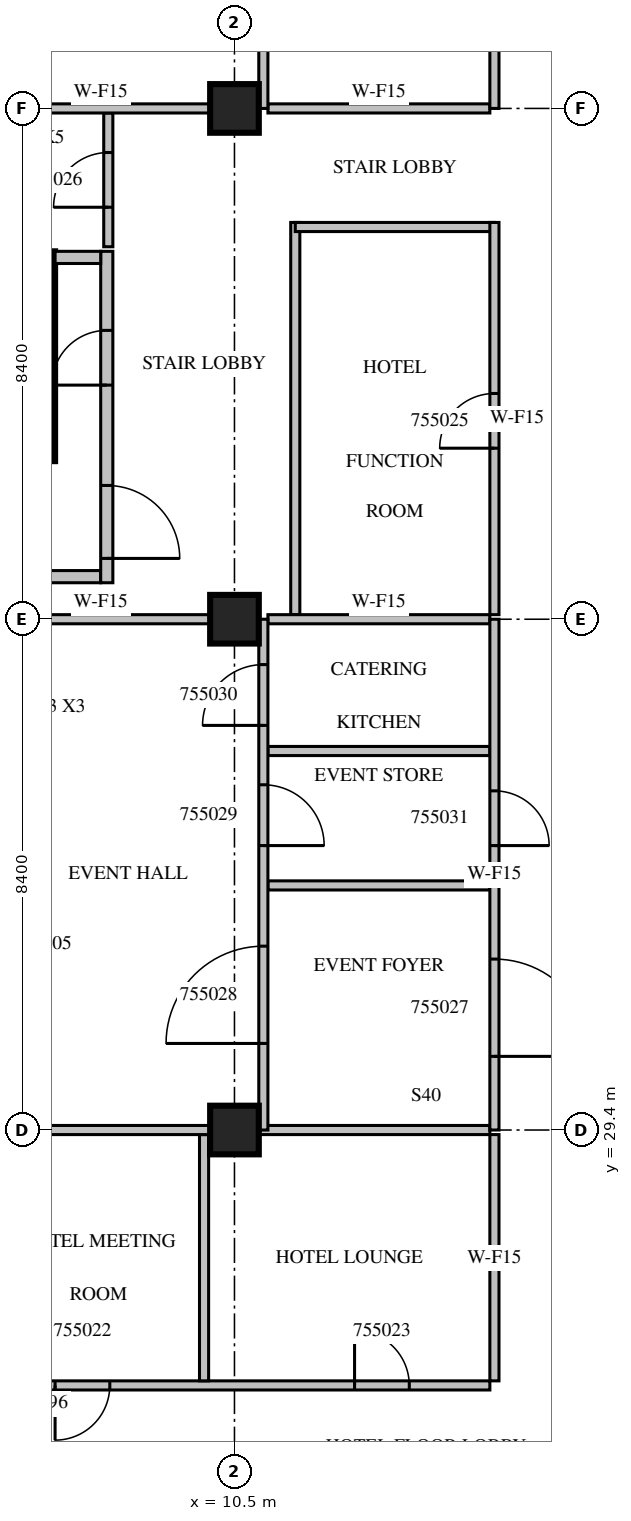
"""IFC4 building model, lengths in metres.
Left out: names, types, materials, properties, quantities, classifications, styles, units other than length and angle.
Written with IfcOpenShell. Run it as: python <this file> out.ifc"""

import sys

from ifc_helpers import new_model, si_unit, direction, frame, frame_2d, origin, origin_2d, place, context, subcontext, project, spatial, rectangle, extrude, source, transform, mapped, element, fill, save


model = new_model("IFC4")
c1 = context("Model", 3, precision=1e-05, world=origin(), true_north=direction((0.0, 1.0)))
c2 = subcontext(c1, "Body", "Model", "MODEL_VIEW")
j1 = project(units=[si_unit("LENGTHUNIT", "METRE"), si_unit("PLANEANGLEUNIT", "RADIAN")], contexts=[c1])
p1 = place(None, origin())
s1 = spatial("IfcSite", under=j1, at=p1, CompositionType="ELEMENT")
p2 = place(p1, origin())
s2 = spatial("IfcBuilding", under=s1, at=p2, CompositionType="ELEMENT")
p3 = place(p2, frame((0.0, 0.0, 242.4)))
s3 = spatial("IfcBuildingStorey", under=s2, at=p3, CompositionType="ELEMENT", Elevation=242.4)
m1 = source(origin(), c2, "Body", "SweptSolid", [
    extrude(rectangle(XDim=0.8, YDim=0.8, at=origin_2d()), origin(), (0.0, 0.0, 1.0), 3.8),
])
for number, where, z_axis, x_axis in (
    (1, (10.5, 29.4, 0.0), (0.0, 0.0, 1.0), (1.0, 0.0, 0.0)),
    (2, (10.5, 37.8, 0.0), (0.0, 0.0, 1.0), (1.0, 0.0, 0.0)),
    (3, (10.5, 46.2, 0.0), (0.0, 0.0, 1.0), (1.0, 0.0, 0.0)),
):
    element("IfcColumn", number, at=place(p3, frame(where, z_axis=z_axis, x_axis=x_axis)), inside=s3, PredefinedType="COLUMN", context=c2, shape_type="MappedRepresentation", body=[
        mapped(m1, transform((0.0, 0.0, 0.0), scale=1.0)),
    ])
m2 = source(origin(), c2, "Body", "SweptSolid", [
    extrude(rectangle(XDim=3.45, YDim=0.25, at=frame_2d((1.725, 0.0))), origin(), (0.0, 0.0, 1.0), 3.4),
])
p4 = place(p3, frame((7.425, 40.4, 0.0), z_axis=(0.0, 0.0, 1.0), x_axis=(0.0, 1.0, 0.0)))
e4 = element("IfcWall", 4, at=p4, inside=s3, PredefinedType="SOLIDWALL", context=c2, shape_type="MappedRepresentation", body=[
    mapped(m2, transform((0.0, 0.0, 0.0), scale=1.0)),
])
m3 = source(origin(), c2, "Body", "SweptSolid", [
    extrude(rectangle(XDim=2.0, YDim=0.2, at=frame_2d((1.0, 0.0))), origin(), (0.0, 0.0, 1.0), 3.4),
])
p5 = place(p3, frame((6.3, 38.5, 0.0), z_axis=(0.0, 0.0, 1.0), x_axis=(1.0, 0.0, 0.0)))
e5 = element("IfcWall", 5, at=p5, inside=s3, PredefinedType="PARTITIONING", context=c2, shape_type="MappedRepresentation", body=[
    mapped(m3, transform((0.0, 0.0, 0.0), scale=1.0)),
])
m4 = source(origin(), c2, "Body", "SweptSolid", [
    extrude(rectangle(XDim=5.45, YDim=0.2, at=frame_2d((2.725, 0.0))), origin(), (0.0, 0.0, 1.0), 3.4),
])
p6 = place(p3, frame((8.4, 38.4, 0.0), z_axis=(0.0, 0.0, 1.0), x_axis=(0.0, 1.0, 0.0)))
e6 = element("IfcWall", 6, at=p6, inside=s3, PredefinedType="PARTITIONING", context=c2, shape_type="MappedRepresentation", body=[
    mapped(m4, transform((0.0, 0.0, 0.0), scale=1.0)),
])
m5 = source(origin(), c2, "Body", "SweptSolid", [
    extrude(rectangle(XDim=1.2, YDim=2.1, at=frame_2d((0.6, 1.05))), frame((0.0, 0.11, 0.0), z_axis=(0.0, -1.0, 0.0), x_axis=(1.0, 0.0, 0.0)), (0.0, 0.0, 1.0), 0.22),
])
p7 = place(p6, frame((0.4, 0.0, 0.0)))
e7 = element("IfcOpeningElement", 7, at=p7, cuts=e6, PredefinedType="OPENING", context=c2, shape_type="MappedRepresentation", body=[
    mapped(m5, transform((0.0, 0.0, 0.0), scale=1.0)),
])
m6 = source(origin(), c2, "Body", "SweptSolid", [
    extrude(rectangle(XDim=0.9, YDim=2.1, at=frame_2d((0.45, 1.05))), frame((0.0, 0.11, 0.0), z_axis=(0.0, -1.0, 0.0), x_axis=(1.0, 0.0, 0.0)), (0.0, 0.0, 1.0), 0.22),
])
p8 = place(p6, frame((3.25, 0.0, 0.0)))
e8 = element("IfcOpeningElement", 8, at=p8, cuts=e6, PredefinedType="OPENING", context=c2, shape_type="MappedRepresentation", body=[
    mapped(m6, transform((0.0, 0.0, 0.0), scale=1.0)),
])
m7 = source(origin(), c2, "Body", "SweptSolid", [
    extrude(rectangle(XDim=0.75, YDim=0.2, at=frame_2d((0.375, 0.0))), origin(), (0.0, 0.0, 1.0), 3.4),
])
p9 = place(p3, frame((7.55, 43.75, 0.0), z_axis=(0.0, 0.0, 1.0), x_axis=(1.0, 0.0, 0.0)))
e9 = element("IfcWall", 9, at=p9, inside=s3, PredefinedType="PARTITIONING", context=c2, shape_type="MappedRepresentation", body=[
    mapped(m7, transform((0.0, 0.0, 0.0), scale=1.0)),
])
m8 = source(origin(), c2, "Body", "SweptSolid", [
    extrude(rectangle(XDim=8.195, YDim=0.15, at=frame_2d((4.098, 0.0))), origin(), (0.0, 0.0, 1.0), 3.4),
])
p10 = place(p3, frame((6.505, 25.2, 0.0), z_axis=(0.0, 0.0, 1.0), x_axis=(1.0, 0.0, 0.0)))
e10 = element("IfcWall", 10, at=p10, inside=s3, PredefinedType="PARTITIONING", context=c2, shape_type="MappedRepresentation", body=[
    mapped(m8, transform((0.0, 0.0, 0.0), scale=1.0)),
])
m9 = source(origin(), c2, "Body", "SweptSolid", [
    extrude(rectangle(XDim=0.9, YDim=2.1, at=frame_2d((0.45, 1.05))), frame((0.0, 0.085, 0.0), z_axis=(0.0, -1.0, 0.0), x_axis=(1.0, 0.0, 0.0)), (0.0, 0.0, 1.0), 0.17),
])
p11 = place(p10, frame((1.045, 0.0, 0.0)))
e11 = element("IfcOpeningElement", 11, at=p11, cuts=e10, PredefinedType="OPENING", context=c2, shape_type="MappedRepresentation", body=[
    mapped(m9, transform((0.0, 0.0, 0.0), scale=1.0)),
])
p12 = place(p10, frame((5.97, 0.0, 0.0)))
e12 = element("IfcOpeningElement", 12, at=p12, cuts=e10, PredefinedType="OPENING", context=c2, shape_type="MappedRepresentation", body=[
    mapped(m9, transform((0.0, 0.0, 0.0), scale=1.0)),
])
m10 = source(origin(), c2, "Body", "SweptSolid", [
    extrude(rectangle(XDim=4.05, YDim=0.15, at=frame_2d((2.025, 0.0))), origin(), (0.0, 0.0, 1.0), 3.4),
])
for number, where, z_axis, x_axis in (
    (13, (10.0, 25.275, 0.0), (0.0, 0.0, 1.0), (0.0, 1.0, 0.0)),
    (14, (14.775, 25.275, 0.0), (0.0, 0.0, 1.0), (0.0, 1.0, 0.0)),
):
    element("IfcWall", number, at=place(p3, frame(where, z_axis=z_axis, x_axis=x_axis)), inside=s3, PredefinedType="PARTITIONING", context=c2, shape_type="MappedRepresentation", body=[
        mapped(m10, transform((0.0, 0.0, 0.0), scale=1.0)),
    ])
m11 = source(origin(), c2, "Body", "SweptSolid", [
    extrude(rectangle(XDim=3.596, YDim=0.15, at=frame_2d((1.798, 0.0))), origin(), (0.0, 0.0, 1.0), 3.4),
])
p13 = place(p3, frame((10.101, 29.4, 0.0), z_axis=(0.0, 0.0, 1.0), x_axis=(-1.0, 0.0, 0.0)))
e15 = element("IfcWall", 15, at=p13, inside=s3, PredefinedType="PARTITIONING", context=c2, shape_type="MappedRepresentation", body=[
    mapped(m11, transform((0.0, 0.0, 0.0), scale=1.0)),
])
m12 = source(origin(), c2, "Body", "SweptSolid", [
    extrude(rectangle(XDim=3.801, YDim=0.15, at=frame_2d((1.901, 0.0))), origin(), (0.0, 0.0, 1.0), 3.4),
])
p14 = place(p3, frame((14.7, 29.4, 0.0), z_axis=(0.0, 0.0, 1.0), x_axis=(-1.0, 0.0, 0.0)))
e16 = element("IfcWall", 16, at=p14, inside=s3, PredefinedType="PARTITIONING", context=c2, shape_type="MappedRepresentation", body=[
    mapped(m12, transform((0.0, 0.0, 0.0), scale=1.0)),
])
m13 = source(origin(), c2, "Body", "SweptSolid", [
    extrude(rectangle(XDim=6.45, YDim=0.15, at=frame_2d((3.225, 0.0))), origin(), (0.0, 0.0, 1.0), 3.4),
])
p15 = place(p3, frame((11.5, 44.325, 0.0), z_axis=(0.0, 0.0, 1.0), x_axis=(0.0, -1.0, 0.0)))
e17 = element("IfcWall", 17, at=p15, inside=s3, PredefinedType="PARTITIONING", context=c2, shape_type="MappedRepresentation", body=[
    mapped(m13, transform((0.0, 0.0, 0.0), scale=1.0)),
])
m14 = source(origin(), c2, "Body", "SweptSolid", [
    extrude(rectangle(XDim=3.275, YDim=0.15, at=frame_2d((1.637, 0.0))), origin(), (0.0, 0.0, 1.0), 3.4),
])
p16 = place(p3, frame((14.775, 44.25, 0.0), z_axis=(0.0, 0.0, 1.0), x_axis=(-1.0, 0.0, 0.0)))
e18 = element("IfcWall", 18, at=p16, inside=s3, PredefinedType="PARTITIONING", context=c2, shape_type="MappedRepresentation", body=[
    mapped(m14, transform((0.0, 0.0, 0.0), scale=1.0)),
])
p17 = place(p3, frame((14.775, 37.875, 0.0), z_axis=(0.0, 0.0, 1.0), x_axis=(0.0, 1.0, 0.0)))
e19 = element("IfcWall", 19, at=p17, inside=s3, PredefinedType="PARTITIONING", context=c2, shape_type="MappedRepresentation", body=[
    mapped(m13, transform((0.0, 0.0, 0.0), scale=1.0)),
])
p18 = place(p17, frame((2.737, 0.0, 0.0)))
e20 = element("IfcOpeningElement", 20, at=p18, cuts=e19, PredefinedType="OPENING", context=c2, shape_type="MappedRepresentation", body=[
    mapped(m9, transform((0.0, 0.0, 0.0), scale=1.0)),
])
m15 = source(origin(), c2, "Body", "SweptSolid", [
    extrude(rectangle(XDim=2.2, YDim=0.15, at=frame_2d((1.1, 0.0))), origin(), (0.0, 0.0, 1.0), 3.4),
])
p19 = place(p3, frame((8.425, 43.925, 0.0), z_axis=(0.0, 0.0, 1.0), x_axis=(0.0, 1.0, 0.0)))
e21 = element("IfcWall", 21, at=p19, inside=s3, PredefinedType="PARTITIONING", context=c2, shape_type="MappedRepresentation", body=[
    mapped(m15, transform((0.0, 0.0, 0.0), scale=1.0)),
])
p20 = place(p19, frame((0.65, 0.0, 0.0)))
e22 = element("IfcOpeningElement", 22, at=p20, cuts=e21, PredefinedType="OPENING", context=c2, shape_type="MappedRepresentation", body=[
    mapped(m9, transform((0.0, 0.0, 0.0), scale=1.0)),
])
m16 = source(origin(), c2, "Body", "SweptSolid", [
    extrude(rectangle(XDim=3.65, YDim=0.15, at=frame_2d((1.825, 0.0))), origin(), (0.0, 0.0, 1.0), 3.4),
])
for number, where, z_axis, x_axis in (
    (23, (14.7, 33.422, 0.0), (0.0, 0.0, 1.0), (-1.0, 0.0, 0.0)),
    (24, (14.7, 35.633, 0.0), (0.0, 0.0, 1.0), (-1.0, 0.0, 0.0)),
):
    element("IfcWall", number, at=place(p3, frame(where, z_axis=z_axis, x_axis=x_axis)), inside=s3, PredefinedType="PARTITIONING", context=c2, shape_type="MappedRepresentation", body=[
        mapped(m16, transform((0.0, 0.0, 0.0), scale=1.0)),
    ])
p21 = place(p3, frame((10.101, 37.8, 0.0), z_axis=(0.0, 0.0, 1.0), x_axis=(-1.0, 0.0, 0.0)))
e25 = element("IfcWall", 25, at=p21, inside=s3, PredefinedType="PARTITIONING", context=c2, shape_type="MappedRepresentation", body=[
    mapped(m11, transform((0.0, 0.0, 0.0), scale=1.0)),
])
p22 = place(p3, frame((14.7, 37.8, 0.0), z_axis=(0.0, 0.0, 1.0), x_axis=(-1.0, 0.0, 0.0)))
e26 = element("IfcWall", 26, at=p22, inside=s3, PredefinedType="PARTITIONING", context=c2, shape_type="MappedRepresentation", body=[
    mapped(m16, transform((0.0, 0.0, 0.0), scale=1.0)),
])
m17 = source(origin(), c2, "Body", "SweptSolid", [
    extrude(rectangle(XDim=8.4, YDim=0.15, at=frame_2d((4.2, 0.0))), origin(), (0.0, 0.0, 1.0), 3.4),
])
p23 = place(p3, frame((10.975, 29.4, 0.0), z_axis=(0.0, 0.0, 1.0), x_axis=(0.0, 1.0, 0.0)))
e27 = element("IfcWall", 27, at=p23, inside=s3, PredefinedType="PARTITIONING", context=c2, shape_type="MappedRepresentation", body=[
    mapped(m17, transform((0.0, 0.0, 0.0), scale=1.0)),
])
m18 = source(origin(), c2, "Body", "SweptSolid", [
    extrude(rectangle(XDim=1.6, YDim=2.1, at=frame_2d((0.8, 1.05))), frame((0.0, 0.085, 0.0), z_axis=(0.0, -1.0, 0.0), x_axis=(1.0, 0.0, 0.0)), (0.0, 0.0, 1.0), 0.17),
])
p24 = place(p23, frame((1.424, 0.0, 0.0)))
e28 = element("IfcOpeningElement", 28, at=p24, cuts=e27, PredefinedType="OPENING", context=c2, shape_type="MappedRepresentation", body=[
    mapped(m18, transform((0.0, 0.0, 0.0), scale=1.0)),
])
m19 = source(origin(), c2, "Body", "SweptSolid", [
    extrude(rectangle(XDim=1.0, YDim=2.1, at=frame_2d((0.5, 1.05))), frame((0.0, 0.085, 0.0), z_axis=(0.0, -1.0, 0.0), x_axis=(1.0, 0.0, 0.0)), (0.0, 0.0, 1.0), 0.17),
])
p25 = place(p23, frame((4.678, 0.0, 0.0)))
e29 = element("IfcOpeningElement", 29, at=p25, cuts=e27, PredefinedType="OPENING", context=c2, shape_type="MappedRepresentation", body=[
    mapped(m19, transform((0.0, 0.0, 0.0), scale=1.0)),
])
p26 = place(p23, frame((6.654, 0.0, 0.0)))
e30 = element("IfcOpeningElement", 30, at=p26, cuts=e27, PredefinedType="OPENING", context=c2, shape_type="MappedRepresentation", body=[
    mapped(m19, transform((0.0, 0.0, 0.0), scale=1.0)),
])
p27 = place(p3, frame((10.101, 46.2, 0.0), z_axis=(0.0, 0.0, 1.0), x_axis=(-1.0, 0.0, 0.0)))
e31 = element("IfcWall", 31, at=p27, inside=s3, PredefinedType="PARTITIONING", context=c2, shape_type="MappedRepresentation", body=[
    mapped(m11, transform((0.0, 0.0, 0.0), scale=1.0)),
])
p28 = place(p3, frame((14.7, 46.2, 0.0), z_axis=(0.0, 0.0, 1.0), x_axis=(-1.0, 0.0, 0.0)))
e32 = element("IfcWall", 32, at=p28, inside=s3, PredefinedType="PARTITIONING", context=c2, shape_type="MappedRepresentation", body=[
    mapped(m16, transform((0.0, 0.0, 0.0), scale=1.0)),
])
m20 = source(origin(), c2, "Body", "SweptSolid", [
    extrude(rectangle(XDim=7.26, YDim=0.15, at=frame_2d((3.63, 0.0))), origin(), (0.0, 0.0, 1.0), 3.4),
])
p29 = place(p3, frame((10.975, 46.2, 0.0), z_axis=(0.0, 0.0, 1.0), x_axis=(0.0, 1.0, 0.0)))
e33 = element("IfcWall", 33, at=p29, inside=s3, PredefinedType="PARTITIONING", context=c2, shape_type="MappedRepresentation", body=[
    mapped(m20, transform((0.0, 0.0, 0.0), scale=1.0)),
])
p30 = place(p29, frame((1.169, 0.0, 0.0)))
e34 = element("IfcOpeningElement", 34, at=p30, cuts=e33, PredefinedType="OPENING", context=c2, shape_type="MappedRepresentation", body=[
    mapped(m18, transform((0.0, 0.0, 0.0), scale=1.0)),
])
p31 = place(p29, frame((4.025, 0.0, 0.0)))
e35 = element("IfcOpeningElement", 35, at=p31, cuts=e33, PredefinedType="OPENING", context=c2, shape_type="MappedRepresentation", body=[
    mapped(m19, transform((0.0, 0.0, 0.0), scale=1.0)),
])
p32 = place(p3, frame((14.775, 29.4, 0.0), z_axis=(0.0, 0.0, 1.0), x_axis=(0.0, 1.0, 0.0)))
e36 = element("IfcWall", 36, at=p32, inside=s3, PredefinedType="PARTITIONING", context=c2, shape_type="MappedRepresentation", body=[
    mapped(m17, transform((0.0, 0.0, 0.0), scale=1.0)),
])
p33 = place(p32, frame((1.211, 0.0, 0.0)))
e37 = element("IfcOpeningElement", 37, at=p33, cuts=e36, PredefinedType="OPENING", context=c2, shape_type="MappedRepresentation", body=[
    mapped(m18, transform((0.0, 0.0, 0.0), scale=1.0)),
])
p34 = place(p32, frame((4.678, 0.0, 0.0)))
e38 = element("IfcOpeningElement", 38, at=p34, cuts=e36, PredefinedType="OPENING", context=c2, shape_type="MappedRepresentation", body=[
    mapped(m9, transform((0.0, 0.0, 0.0), scale=1.0)),
])
p35 = place(p3, frame((14.775, 46.2, 0.0), z_axis=(0.0, 0.0, 1.0), x_axis=(0.0, 1.0, 0.0)))
e39 = element("IfcWall", 39, at=p35, inside=s3, PredefinedType="PARTITIONING", context=c2, shape_type="MappedRepresentation", body=[
    mapped(m20, transform((0.0, 0.0, 0.0), scale=1.0)),
])
p36 = place(p35, frame((0.956, 0.0, 0.0)))
e40 = element("IfcOpeningElement", 40, at=p36, cuts=e39, PredefinedType="OPENING", context=c2, shape_type="MappedRepresentation", body=[
    mapped(m18, transform((0.0, 0.0, 0.0), scale=1.0)),
])
p37 = place(p35, frame((4.025, 0.0, 0.0)))
e41 = element("IfcOpeningElement", 41, at=p37, cuts=e39, PredefinedType="OPENING", context=c2, shape_type="MappedRepresentation", body=[
    mapped(m9, transform((0.0, 0.0, 0.0), scale=1.0)),
])
m21 = source(origin(), c2, "Body", "SweptSolid", [
    extrude(rectangle(XDim=1.2, YDim=2.1, at=frame_2d((0.6, 1.05))), frame((0.0, 0.025, 0.0), z_axis=(0.0, -1.0, 0.0), x_axis=(1.0, 0.0, 0.0)), (0.0, 0.0, 1.0), 0.05),
])
p38 = place(p7, origin())
e42 = element("IfcDoor", 42, at=p38, inside=s3, OperationType="SINGLE_SWING_RIGHT", PredefinedType="DOOR", context=c2, shape_type="MappedRepresentation", body=[
    mapped(m21, transform((0.0, 0.0, 0.0), scale=1.0)),
])
fill(e7, e42)
m22 = source(origin(), c2, "Body", "SweptSolid", [
    extrude(rectangle(XDim=0.9, YDim=2.1, at=frame_2d((0.45, 1.05))), frame((0.0, 0.025, 0.0), z_axis=(0.0, -1.0, 0.0), x_axis=(1.0, 0.0, 0.0)), (0.0, 0.0, 1.0), 0.05),
])
p39 = place(p8, origin())
e43 = element("IfcDoor", 43, at=p39, inside=s3, OperationType="SINGLE_SWING_LEFT", PredefinedType="DOOR", context=c2, shape_type="MappedRepresentation", body=[
    mapped(m22, transform((0.0, 0.0, 0.0), scale=1.0)),
])
fill(e8, e43)
p40 = place(p11, origin())
e44 = element("IfcDoor", 44, at=p40, inside=s3, OperationType="SINGLE_SWING_RIGHT", PredefinedType="DOOR", context=c2, shape_type="MappedRepresentation", body=[
    mapped(m22, transform((0.0, 0.0, 0.0), scale=1.0)),
])
fill(e11, e44)
p41 = place(p12, origin())
e45 = element("IfcDoor", 45, at=p41, inside=s3, OperationType="SINGLE_SWING_LEFT", PredefinedType="DOOR", context=c2, shape_type="MappedRepresentation", body=[
    mapped(m22, transform((0.0, 0.0, 0.0), scale=1.0)),
])
fill(e12, e45)
p42 = place(p18, origin())
e46 = element("IfcDoor", 46, at=p42, inside=s3, OperationType="SINGLE_SWING_LEFT", PredefinedType="DOOR", context=c2, shape_type="MappedRepresentation", body=[
    mapped(m22, transform((0.0, 0.0, 0.0), scale=1.0)),
])
fill(e20, e46)
p43 = place(p20, origin())
e47 = element("IfcDoor", 47, at=p43, inside=s3, OperationType="SINGLE_SWING_LEFT", PredefinedType="DOOR", context=c2, shape_type="MappedRepresentation", body=[
    mapped(m22, transform((0.0, 0.0, 0.0), scale=1.0)),
])
fill(e22, e47)
m23 = source(origin(), c2, "Body", "SweptSolid", [
    extrude(rectangle(XDim=1.6, YDim=2.1, at=frame_2d((0.8, 1.05))), frame((0.0, 0.025, 0.0), z_axis=(0.0, -1.0, 0.0), x_axis=(1.0, 0.0, 0.0)), (0.0, 0.0, 1.0), 0.05),
])
p44 = place(p33, origin())
e48 = element("IfcDoor", 48, at=p44, inside=s3, OperationType="SINGLE_SWING_RIGHT", PredefinedType="DOOR", context=c2, shape_type="MappedRepresentation", body=[
    mapped(m23, transform((0.0, 0.0, 0.0), scale=1.0)),
])
fill(e37, e48)
p45 = place(p24, origin())
e49 = element("IfcDoor", 49, at=p45, inside=s3, OperationType="SINGLE_SWING_LEFT", PredefinedType="DOOR", context=c2, shape_type="MappedRepresentation", body=[
    mapped(m23, transform((0.0, 0.0, 0.0), scale=1.0)),
])
fill(e28, e49)
m24 = source(origin(), c2, "Body", "SweptSolid", [
    extrude(rectangle(XDim=1.0, YDim=2.1, at=frame_2d((0.5, 1.05))), frame((0.0, 0.025, 0.0), z_axis=(0.0, -1.0, 0.0), x_axis=(1.0, 0.0, 0.0)), (0.0, 0.0, 1.0), 0.05),
])
p46 = place(p25, origin())
e50 = element("IfcDoor", 50, at=p46, inside=s3, OperationType="SINGLE_SWING_RIGHT", PredefinedType="DOOR", context=c2, shape_type="MappedRepresentation", body=[
    mapped(m24, transform((0.0, 0.0, 0.0), scale=1.0)),
])
fill(e29, e50)
p47 = place(p26, origin())
e51 = element("IfcDoor", 51, at=p47, inside=s3, OperationType="SINGLE_SWING_LEFT", PredefinedType="DOOR", context=c2, shape_type="MappedRepresentation", body=[
    mapped(m24, transform((0.0, 0.0, 0.0), scale=1.0)),
])
fill(e30, e51)
p48 = place(p34, origin())
e52 = element("IfcDoor", 52, at=p48, inside=s3, OperationType="SINGLE_SWING_RIGHT", PredefinedType="DOOR", context=c2, shape_type="MappedRepresentation", body=[
    mapped(m22, transform((0.0, 0.0, 0.0), scale=1.0)),
])
fill(e38, e52)
save(model, sys.argv[1])
